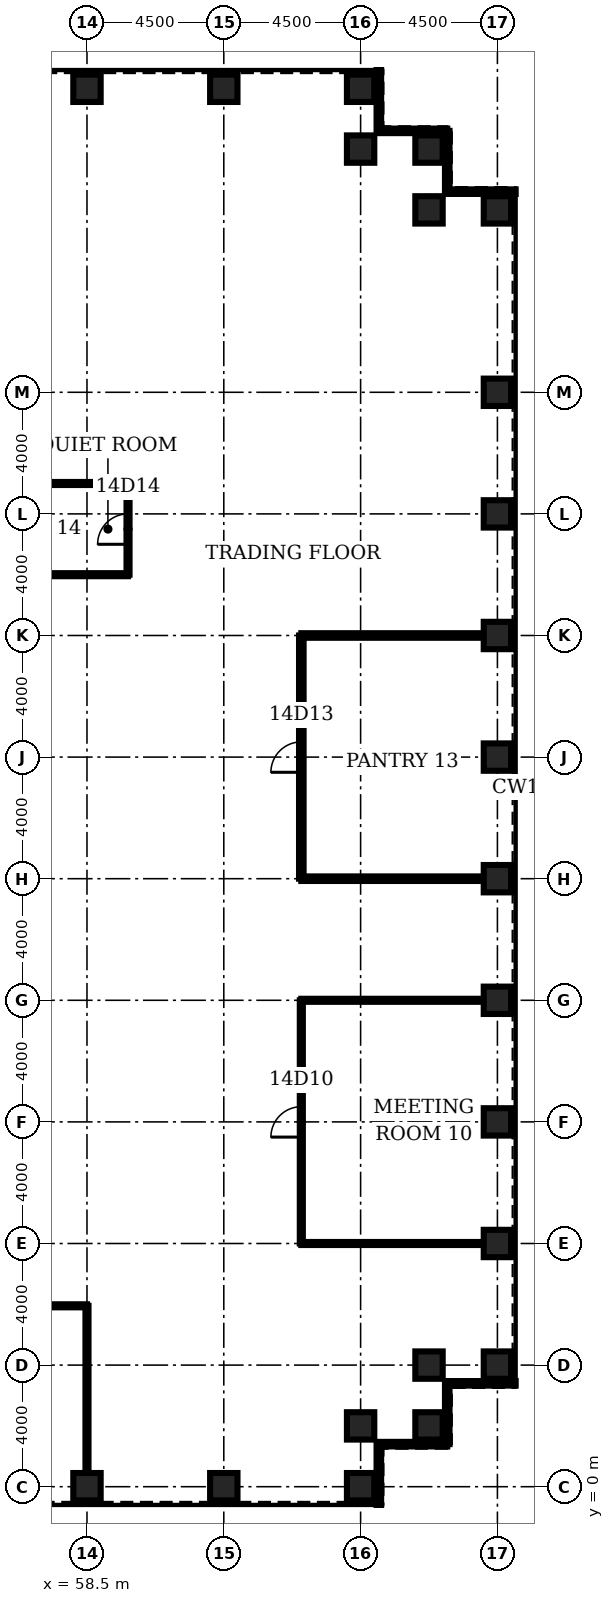
"""IFC4 building model, lengths in metres.
Left out: names, types, materials, properties, quantities, classifications, styles, units other than length and angle.
Written with IfcOpenShell. Run it as: python <this file> out.ifc"""

import sys

from ifc_helpers import new_model, si_unit, direction, frame, frame_2d, origin, origin_2d, place, context, subcontext, project, spatial, rectangle, hollow_rectangle, extrude, element, fill, save


model = new_model("IFC4")
c1 = context("Model", 3, precision=1e-05, world=origin(), true_north=direction((0.0, 1.0)))
c2 = subcontext(c1, "Body", "Model", "MODEL_VIEW")
j1 = project(units=[si_unit("LENGTHUNIT", "METRE"), si_unit("PLANEANGLEUNIT", "RADIAN")], contexts=[c1])
p1 = place(None, origin())
s1 = spatial("IfcSite", under=j1, at=p1, CompositionType="ELEMENT")
p2 = place(p1, origin())
s2 = spatial("IfcBuilding", under=s1, at=p2, CompositionType="ELEMENT")
p3 = place(p2, frame((0.0, 0.0, 68.0)))
s3 = spatial("IfcBuildingStorey", under=s2, at=p3, CompositionType="ELEMENT", Elevation=68.0)
for number, where, z_axis, x_axis in (
    (1, (58.5, 0.0, 0.0), (0.0, 0.0, 1.0), (0.0, 1.0, 0.0)),
    (2, (63.0, 0.0, 0.0), (0.0, 0.0, 1.0), (0.0, 1.0, 0.0)),
    (3, (67.5, 0.0, 0.0), (0.0, 0.0, 1.0), (0.0, 1.0, 0.0)),
    (4, (67.5, 2.0, 0.0), (0.0, 0.0, 1.0), (0.0, 1.0, 0.0)),
    (5, (69.75, 2.0, 0.0), (0.0, 0.0, 1.0), (1.0, 0.0, 0.0)),
    (6, (69.75, 4.0, 0.0), (0.0, 0.0, 1.0), (1.0, 0.0, 0.0)),
    (7, (72.0, 4.0, 0.0), (0.0, 0.0, 1.0), (1.0, 0.0, 0.0)),
    (8, (72.0, 8.0, 0.0), (0.0, 0.0, 1.0), (1.0, 0.0, 0.0)),
    (9, (72.0, 12.0, 0.0), (0.0, 0.0, 1.0), (1.0, 0.0, 0.0)),
    (10, (72.0, 16.0, 0.0), (0.0, 0.0, 1.0), (1.0, 0.0, 0.0)),
    (11, (72.0, 20.0, 0.0), (0.0, 0.0, 1.0), (1.0, 0.0, 0.0)),
    (12, (72.0, 24.0, 0.0), (0.0, 0.0, 1.0), (1.0, 0.0, 0.0)),
    (13, (72.0, 28.0, 0.0), (0.0, 0.0, 1.0), (1.0, 0.0, 0.0)),
    (14, (72.0, 32.0, 0.0), (0.0, 0.0, 1.0), (1.0, 0.0, 0.0)),
    (15, (72.0, 36.0, 0.0), (0.0, 0.0, 1.0), (1.0, 0.0, 0.0)),
    (16, (72.0, 42.0, 0.0), (0.0, 0.0, 1.0), (1.0, 0.0, 0.0)),
    (17, (69.75, 42.0, 0.0), (0.0, 0.0, 1.0), (1.0, 0.0, 0.0)),
    (18, (69.75, 44.0, 0.0), (0.0, 0.0, 1.0), (1.0, 0.0, 0.0)),
    (19, (67.5, 44.0, 0.0), (0.0, 0.0, 1.0), (0.0, 1.0, 0.0)),
    (20, (67.5, 46.0, 0.0), (0.0, 0.0, 1.0), (0.0, 1.0, 0.0)),
    (21, (63.0, 46.0, 0.0), (0.0, 0.0, 1.0), (0.0, 1.0, 0.0)),
    (22, (58.5, 46.0, 0.0), (0.0, 0.0, 1.0), (0.0, 1.0, 0.0)),
):
    element("IfcColumn", number, at=place(p3, frame(where, z_axis=z_axis, x_axis=x_axis)), inside=s3, PredefinedType="COLUMN", context=c2, shape_type="SweptSolid", body=[
        extrude(hollow_rectangle(XDim=0.9, YDim=0.9, WallThickness=0.12, at=origin_2d()), origin(), (0.0, 0.0, 1.0), 4.5),
    ])
p4 = place(p3, frame((49.5, 5.95, 0.0), z_axis=(0.0, 0.0, 1.0), x_axis=(1.0, 0.0, 0.0)))
e23 = element("IfcWall", 23, at=p4, inside=s3, PredefinedType="PARTITIONING", context=c2, shape_type="SweptSolid", body=[
    extrude(rectangle(XDim=9.0, YDim=0.1, at=frame_2d((4.5, 0.0))), origin(), (0.0, 0.0, 1.0), 3.0),
])
p5 = place(p4, frame((4.0, 0.0, 0.0)))
e24 = element("IfcOpeningElement", 24, at=p5, cuts=e23, PredefinedType="OPENING", context=c2, shape_type="SweptSolid", body=[
    extrude(rectangle(XDim=1.0, YDim=2.1, at=frame_2d((0.5, 1.05))), frame((0.0, 0.06, 0.0), z_axis=(0.0, -1.0, 0.0), x_axis=(1.0, 0.0, 0.0)), (0.0, 0.0, 1.0), 0.12),
])
for number, where, z_axis, x_axis in (
    (25, (65.55, 8.0, 0.0), (0.0, 0.0, 1.0), (1.0, 0.0, 0.0)),
    (26, (65.55, 16.0, 0.0), (0.0, 0.0, 1.0), (1.0, 0.0, 0.0)),
):
    element("IfcWall", number, at=place(p3, frame(where, z_axis=z_axis, x_axis=x_axis)), inside=s3, PredefinedType="PARTITIONING", context=c2, shape_type="SweptSolid", body=[
        extrude(rectangle(XDim=6.0, YDim=0.1, at=frame_2d((3.0, 0.0))), origin(), (0.0, 0.0, 1.0), 3.0),
    ])
for number, where, z_axis, x_axis in (
    (27, (65.55, 20.0, 0.0), (0.0, 0.0, 1.0), (1.0, 0.0, 0.0)),
    (28, (65.55, 28.0, 0.0), (0.0, 0.0, 1.0), (1.0, 0.0, 0.0)),
):
    element("IfcWall", number, at=place(p3, frame(where, z_axis=z_axis, x_axis=x_axis)), inside=s3, PredefinedType="PARTITIONING", context=c2, shape_type="SweptSolid", body=[
        extrude(rectangle(XDim=6.0, YDim=0.15, at=frame_2d((3.0, 0.0))), origin(), (0.0, 0.0, 1.0), 3.0),
    ])
for number, where, z_axis, x_axis in (
    (29, (56.85, 30.0, 0.0), (0.0, 0.0, 1.0), (1.0, 0.0, 0.0)),
    (30, (56.85, 33.0, 0.0), (0.0, 0.0, 1.0), (1.0, 0.0, 0.0)),
):
    element("IfcWall", number, at=place(p3, frame(where, z_axis=z_axis, x_axis=x_axis)), inside=s3, PredefinedType="PARTITIONING", context=c2, shape_type="SweptSolid", body=[
        extrude(rectangle(XDim=3.0, YDim=0.1, at=frame_2d((1.5, 0.0))), origin(), (0.0, 0.0, 1.0), 3.0),
    ])
p6 = place(p3, frame((58.5, 0.45, 0.0), z_axis=(0.0, 0.0, 1.0), x_axis=(0.0, 1.0, 0.0)))
e31 = element("IfcWall", 31, at=p6, inside=s3, PredefinedType="PARTITIONING", context=c2, shape_type="SweptSolid", body=[
    extrude(rectangle(XDim=5.5, YDim=0.1, at=frame_2d((2.75, 0.0))), origin(), (0.0, 0.0, 1.0), 3.0),
])
p7 = place(p3, frame((59.85, 30.0, 0.0), z_axis=(0.0, 0.0, 1.0), x_axis=(0.0, 1.0, 0.0)))
e32 = element("IfcWall", 32, at=p7, inside=s3, PredefinedType="PARTITIONING", context=c2, shape_type="SweptSolid", body=[
    extrude(rectangle(XDim=3.0, YDim=0.1, at=frame_2d((1.5, 0.0))), origin(), (0.0, 0.0, 1.0), 3.0),
])
p8 = place(p7, frame((1.0, 0.0, 0.0)))
e33 = element("IfcOpeningElement", 33, at=p8, cuts=e32, PredefinedType="OPENING", context=c2, shape_type="SweptSolid", body=[
    extrude(rectangle(XDim=1.0, YDim=2.1, at=frame_2d((0.5, 1.05))), frame((0.0, 0.06, 0.0), z_axis=(0.0, -1.0, 0.0), x_axis=(1.0, 0.0, 0.0)), (0.0, 0.0, 1.0), 0.12),
])
p9 = place(p3, frame((65.55, 8.0, 0.0), z_axis=(0.0, 0.0, 1.0), x_axis=(0.0, 1.0, 0.0)))
e34 = element("IfcWall", 34, at=p9, inside=s3, PredefinedType="PARTITIONING", context=c2, shape_type="SweptSolid", body=[
    extrude(rectangle(XDim=8.0, YDim=0.1, at=frame_2d((4.0, 0.0))), origin(), (0.0, 0.0, 1.0), 3.0),
])
p10 = place(p9, frame((3.5, 0.0, 0.0)))
e35 = element("IfcOpeningElement", 35, at=p10, cuts=e34, PredefinedType="OPENING", context=c2, shape_type="SweptSolid", body=[
    extrude(rectangle(XDim=1.0, YDim=2.1, at=frame_2d((0.5, 1.05))), frame((0.0, 0.06, 0.0), z_axis=(0.0, -1.0, 0.0), x_axis=(1.0, 0.0, 0.0)), (0.0, 0.0, 1.0), 0.12),
])
p11 = place(p3, frame((65.55, 20.0, 0.0), z_axis=(0.0, 0.0, 1.0), x_axis=(0.0, 1.0, 0.0)))
e36 = element("IfcWall", 36, at=p11, inside=s3, PredefinedType="PARTITIONING", context=c2, shape_type="SweptSolid", body=[
    extrude(rectangle(XDim=8.0, YDim=0.15, at=frame_2d((4.0, 0.0))), origin(), (0.0, 0.0, 1.0), 3.0),
])
p12 = place(p11, frame((3.5, 0.0, 0.0)))
e37 = element("IfcOpeningElement", 37, at=p12, cuts=e36, PredefinedType="OPENING", context=c2, shape_type="SweptSolid", body=[
    extrude(rectangle(XDim=1.0, YDim=2.1, at=frame_2d((0.5, 1.05))), frame((0.0, 0.085, 0.0), z_axis=(0.0, -1.0, 0.0), x_axis=(1.0, 0.0, 0.0)), (0.0, 0.0, 1.0), 0.17),
])
p13 = place(p3, frame((68.1, -0.6, 0.0), z_axis=(0.0, 0.0, 1.0), x_axis=(0.0, 1.0, 0.0)))
e38 = element("IfcWall", 38, at=p13, inside=s3, PredefinedType="ELEMENTEDWALL", context=c2, shape_type="SweptSolid", body=[
    extrude(rectangle(XDim=2.0, YDim=0.15, at=frame_2d((1.0, 0.0))), origin(), (0.0, 0.0, 1.0), 4.32),
])
p14 = place(p3, frame((68.1, 1.4, 0.0), z_axis=(0.0, 0.0, 1.0), x_axis=(1.0, 0.0, 0.0)))
e39 = element("IfcWall", 39, at=p14, inside=s3, PredefinedType="ELEMENTEDWALL", context=c2, shape_type="SweptSolid", body=[
    extrude(rectangle(XDim=2.25, YDim=0.15, at=frame_2d((1.125, 0.0))), origin(), (0.0, 0.0, 1.0), 4.32),
])
p15 = place(p3, frame((70.35, 1.4, 0.0), z_axis=(0.0, 0.0, 1.0), x_axis=(0.0, 1.0, 0.0)))
e40 = element("IfcWall", 40, at=p15, inside=s3, PredefinedType="ELEMENTEDWALL", context=c2, shape_type="SweptSolid", body=[
    extrude(rectangle(XDim=2.0, YDim=0.15, at=frame_2d((1.0, 0.0))), origin(), (0.0, 0.0, 1.0), 4.32),
])
for number, where, z_axis, x_axis in (
    (41, (70.35, 3.4, 0.0), (0.0, 0.0, 1.0), (1.0, 0.0, 0.0)),
    (42, (72.6, 42.6, 0.0), (0.0, 0.0, 1.0), (-1.0, 0.0, 0.0)),
):
    element("IfcWall", number, at=place(p3, frame(where, z_axis=z_axis, x_axis=x_axis)), inside=s3, PredefinedType="ELEMENTEDWALL", context=c2, shape_type="SweptSolid", body=[
        extrude(rectangle(XDim=2.25, YDim=0.15, at=frame_2d((1.125, 0.0))), origin(), (0.0, 0.0, 1.0), 4.32),
    ])
p16 = place(p3, frame((70.35, 42.6, 0.0), z_axis=(0.0, 0.0, 1.0), x_axis=(0.0, 1.0, 0.0)))
e43 = element("IfcWall", 43, at=p16, inside=s3, PredefinedType="ELEMENTEDWALL", context=c2, shape_type="SweptSolid", body=[
    extrude(rectangle(XDim=2.0, YDim=0.15, at=frame_2d((1.0, 0.0))), origin(), (0.0, 0.0, 1.0), 4.32),
])
p17 = place(p3, frame((70.35, 44.6, 0.0), z_axis=(0.0, 0.0, 1.0), x_axis=(-1.0, 0.0, 0.0)))
e44 = element("IfcWall", 44, at=p17, inside=s3, PredefinedType="ELEMENTEDWALL", context=c2, shape_type="SweptSolid", body=[
    extrude(rectangle(XDim=2.25, YDim=0.15, at=frame_2d((1.125, 0.0))), origin(), (0.0, 0.0, 1.0), 4.32),
])
p18 = place(p3, frame((68.1, 44.6, 0.0), z_axis=(0.0, 0.0, 1.0), x_axis=(0.0, 1.0, 0.0)))
e45 = element("IfcWall", 45, at=p18, inside=s3, PredefinedType="ELEMENTEDWALL", context=c2, shape_type="SweptSolid", body=[
    extrude(rectangle(XDim=2.0, YDim=0.15, at=frame_2d((1.0, 0.0))), origin(), (0.0, 0.0, 1.0), 4.32),
])
p19 = place(p10, origin())
e46 = element("IfcDoor", 46, at=p19, inside=s3, OperationType="SINGLE_SWING_LEFT", PredefinedType="DOOR", context=c2, shape_type="SweptSolid", body=[
    extrude(rectangle(XDim=1.0, YDim=2.1, at=frame_2d((0.5, 1.05))), frame((0.0, 0.025, 0.0), z_axis=(0.0, -1.0, 0.0), x_axis=(1.0, 0.0, 0.0)), (0.0, 0.0, 1.0), 0.05),
])
fill(e35, e46)
p20 = place(p12, origin())
e47 = element("IfcDoor", 47, at=p20, inside=s3, OperationType="SINGLE_SWING_LEFT", PredefinedType="DOOR", context=c2, shape_type="SweptSolid", body=[
    extrude(rectangle(XDim=1.0, YDim=2.1, at=frame_2d((0.5, 1.05))), frame((0.0, 0.025, 0.0), z_axis=(0.0, -1.0, 0.0), x_axis=(1.0, 0.0, 0.0)), (0.0, 0.0, 1.0), 0.05),
])
fill(e37, e47)
p21 = place(p8, origin())
e48 = element("IfcDoor", 48, at=p21, inside=s3, OperationType="SINGLE_SWING_LEFT", PredefinedType="DOOR", context=c2, shape_type="SweptSolid", body=[
    extrude(rectangle(XDim=1.0, YDim=2.1, at=frame_2d((0.5, 1.05))), frame((0.0, 0.025, 0.0), z_axis=(0.0, -1.0, 0.0), x_axis=(1.0, 0.0, 0.0)), (0.0, 0.0, 1.0), 0.05),
])
fill(e33, e48)
save(model, sys.argv[1])
